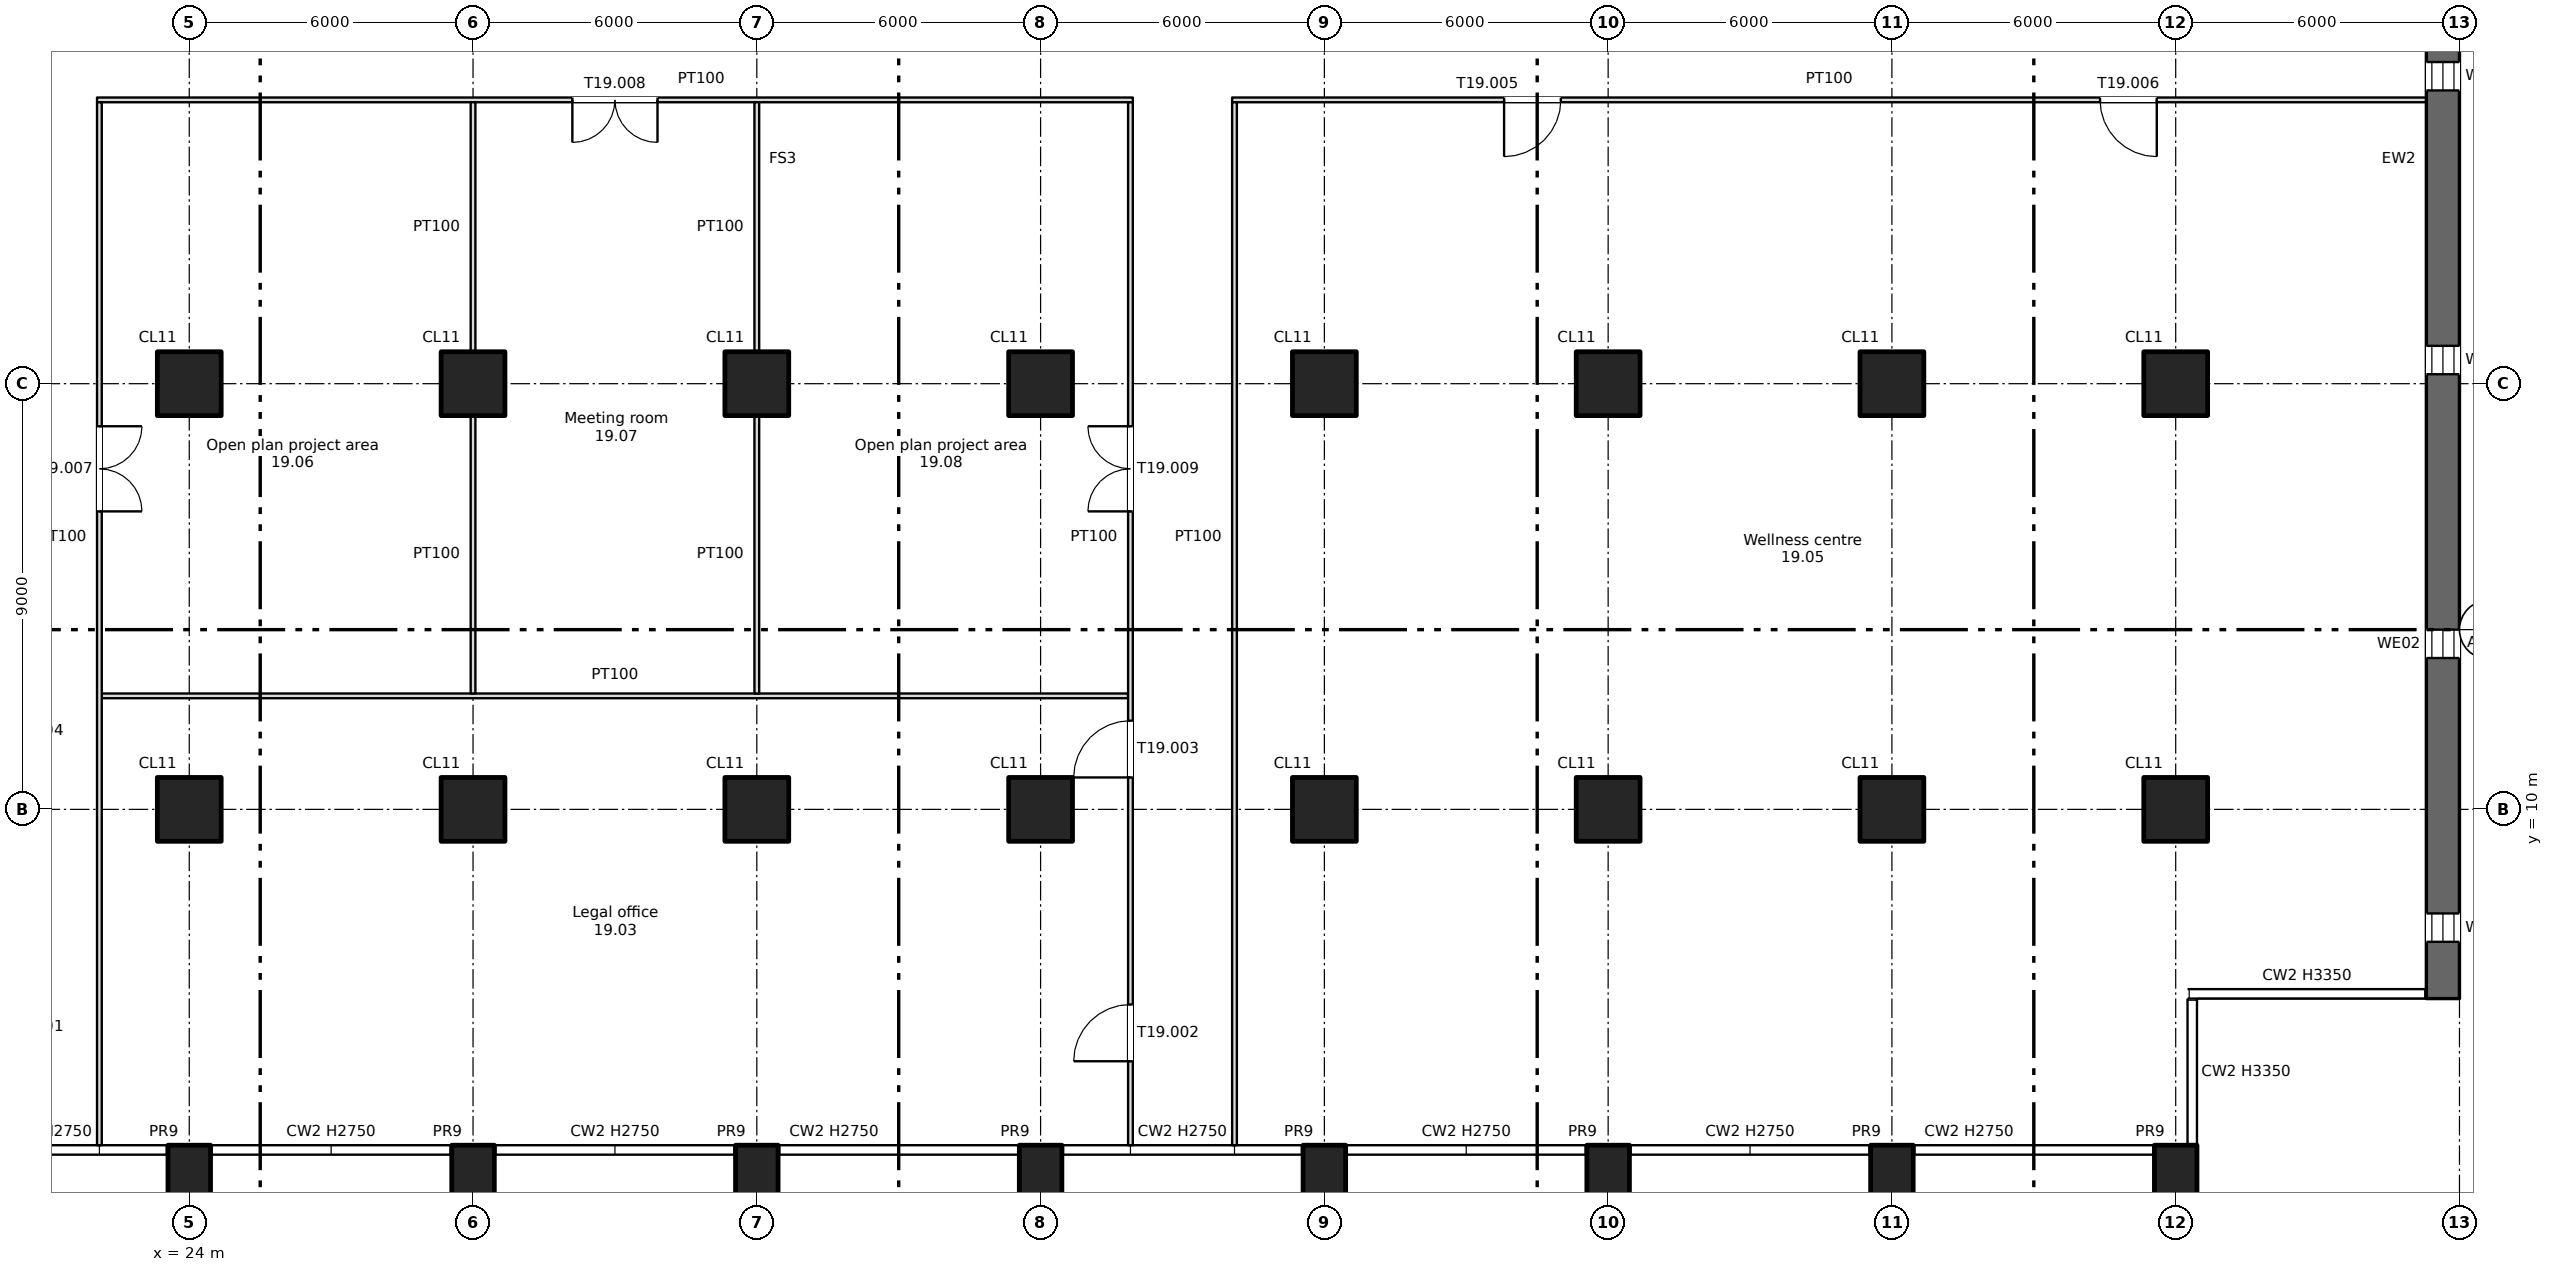
"""IFC4 building model, lengths in metres.
Left out: names, types, materials, properties, quantities, classifications, styles, units other than length and angle.
Written with IfcOpenShell. Run it as: python <this file> out.ifc"""

import sys

from ifc_helpers import new_model, si_unit, direction, frame, frame_2d, origin, origin_2d, place, context, subcontext, project, spatial, rectangle, extrude, element, fill, save


model = new_model("IFC4")
c1 = context("Model", 3, precision=1e-05, world=origin(), true_north=direction((0.0, 1.0)))
c2 = subcontext(c1, "Body", "Model", "MODEL_VIEW")
j1 = project(units=[si_unit("LENGTHUNIT", "METRE"), si_unit("PLANEANGLEUNIT", "RADIAN")], contexts=[c1])
p1 = place(None, origin())
s1 = spatial("IfcSite", under=j1, at=p1, CompositionType="ELEMENT")
p2 = place(p1, origin())
s2 = spatial("IfcBuilding", under=s1, at=p2, CompositionType="ELEMENT")
p3 = place(p2, frame((0.0, 0.0, 121.25)))
s3 = spatial("IfcBuildingStorey", under=s2, at=p3, CompositionType="ELEMENT", Elevation=121.25)
for number, where, z_axis, x_axis in (
    (1, (24.0, 2.2, -0.4), (0.0, 0.0, 1.0), (1.0, 0.0, 0.0)),
    (2, (30.0, 2.2, -0.4), (0.0, 0.0, 1.0), (1.0, 0.0, 0.0)),
    (3, (36.0, 2.2, -0.4), (0.0, 0.0, 1.0), (1.0, 0.0, 0.0)),
    (4, (42.0, 2.2, -0.4), (0.0, 0.0, 1.0), (1.0, 0.0, 0.0)),
    (5, (48.0, 2.2, -0.4), (0.0, 0.0, 1.0), (1.0, 0.0, 0.0)),
    (6, (54.0, 2.2, -0.4), (0.0, 0.0, 1.0), (1.0, 0.0, 0.0)),
    (7, (60.0, 2.2, -0.4), (0.0, 0.0, 1.0), (1.0, 0.0, 0.0)),
    (8, (66.0, 2.2, -0.4), (0.0, 0.0, 1.0), (1.0, 0.0, 0.0)),
):
    element("IfcColumn", number, at=place(p3, frame(where, z_axis=z_axis, x_axis=x_axis)), inside=s3, PredefinedType="COLUMN", context=c2, shape_type="SweptSolid", body=[
        extrude(rectangle(XDim=0.9, YDim=1.4, at=origin_2d()), origin(), (0.0, 0.0, 1.0), 3.75),
    ])
for number, where, z_axis, x_axis in (
    (9, (24.0, 10.0, 0.0), (0.0, 0.0, 1.0), (1.0, 0.0, 0.0)),
    (10, (24.0, 19.0, 0.0), (0.0, 0.0, 1.0), (1.0, 0.0, 0.0)),
    (11, (30.0, 10.0, 0.0), (0.0, 0.0, 1.0), (1.0, 0.0, 0.0)),
    (12, (30.0, 19.0, 0.0), (0.0, 0.0, 1.0), (1.0, 0.0, 0.0)),
    (13, (36.0, 10.0, 0.0), (0.0, 0.0, 1.0), (1.0, 0.0, 0.0)),
    (14, (36.0, 19.0, 0.0), (0.0, 0.0, 1.0), (1.0, 0.0, 0.0)),
    (15, (42.0, 10.0, 0.0), (0.0, 0.0, 1.0), (1.0, 0.0, 0.0)),
    (16, (42.0, 19.0, 0.0), (0.0, 0.0, 1.0), (1.0, 0.0, 0.0)),
    (17, (48.0, 10.0, 0.0), (0.0, 0.0, 1.0), (1.0, 0.0, 0.0)),
    (18, (48.0, 19.0, 0.0), (0.0, 0.0, 1.0), (1.0, 0.0, 0.0)),
    (19, (54.0, 10.0, 0.0), (0.0, 0.0, 1.0), (1.0, 0.0, 0.0)),
    (20, (54.0, 19.0, 0.0), (0.0, 0.0, 1.0), (1.0, 0.0, 0.0)),
    (21, (60.0, 10.0, 0.0), (0.0, 0.0, 1.0), (1.0, 0.0, 0.0)),
    (22, (60.0, 19.0, 0.0), (0.0, 0.0, 1.0), (1.0, 0.0, 0.0)),
    (23, (66.0, 10.0, 0.0), (0.0, 0.0, 1.0), (1.0, 0.0, 0.0)),
    (24, (66.0, 19.0, 0.0), (0.0, 0.0, 1.0), (1.0, 0.0, 0.0)),
):
    element("IfcColumn", number, at=place(p3, frame(where, z_axis=z_axis, x_axis=x_axis)), inside=s3, PredefinedType="COLUMN", context=c2, shape_type="SweptSolid", body=[
        extrude(rectangle(XDim=1.35, YDim=1.35, at=origin_2d()), origin(), (0.0, 0.0, 1.0), 3.35),
    ])
p4 = place(p3, frame((71.65, 6.0, 0.0), z_axis=(0.0, 0.0, 1.0), x_axis=(0.0, 1.0, 0.0)))
e25 = element("IfcWall", 25, at=p4, inside=s3, PredefinedType="SHEAR", context=c2, shape_type="SweptSolid", body=[
    extrude(rectangle(XDim=35.5, YDim=0.7, at=frame_2d((17.75, 0.0))), origin(), (0.0, 0.0, 1.0), 3.35),
])
p5 = place(p4, frame((1.2, 0.0, 0.6)))
e26 = element("IfcOpeningElement", 26, at=p5, cuts=e25, PredefinedType="OPENING", context=c2, shape_type="SweptSolid", body=[
    extrude(rectangle(XDim=0.6, YDim=2.4, at=frame_2d((0.3, 1.2))), frame((0.0, 0.36, 0.0), z_axis=(0.0, -1.0, 0.0), x_axis=(1.0, 0.0, 0.0)), (0.0, 0.0, 1.0), 0.72),
])
p6 = place(p4, frame((7.2, 0.0, 0.6)))
e27 = element("IfcOpeningElement", 27, at=p6, cuts=e25, PredefinedType="OPENING", context=c2, shape_type="SweptSolid", body=[
    extrude(rectangle(XDim=0.6, YDim=2.4, at=frame_2d((0.3, 1.2))), frame((0.0, 0.36, 0.0), z_axis=(0.0, -1.0, 0.0), x_axis=(1.0, 0.0, 0.0)), (0.0, 0.0, 1.0), 0.72),
])
p7 = place(p4, frame((13.2, 0.0, 0.6)))
e28 = element("IfcOpeningElement", 28, at=p7, cuts=e25, PredefinedType="OPENING", context=c2, shape_type="SweptSolid", body=[
    extrude(rectangle(XDim=0.6, YDim=2.4, at=frame_2d((0.3, 1.2))), frame((0.0, 0.36, 0.0), z_axis=(0.0, -1.0, 0.0), x_axis=(1.0, 0.0, 0.0)), (0.0, 0.0, 1.0), 0.72),
])
p8 = place(p4, frame((19.2, 0.0, 0.6)))
e29 = element("IfcOpeningElement", 29, at=p8, cuts=e25, PredefinedType="OPENING", context=c2, shape_type="SweptSolid", body=[
    extrude(rectangle(XDim=0.6, YDim=2.4, at=frame_2d((0.3, 1.2))), frame((0.0, 0.36, 0.0), z_axis=(0.0, -1.0, 0.0), x_axis=(1.0, 0.0, 0.0)), (0.0, 0.0, 1.0), 0.72),
])
p9 = place(p4, frame((25.2, 0.0, 0.6)))
e30 = element("IfcOpeningElement", 30, at=p9, cuts=e25, PredefinedType="OPENING", context=c2, shape_type="SweptSolid", body=[
    extrude(rectangle(XDim=0.6, YDim=2.4, at=frame_2d((0.3, 1.2))), frame((0.0, 0.36, 0.0), z_axis=(0.0, -1.0, 0.0), x_axis=(1.0, 0.0, 0.0)), (0.0, 0.0, 1.0), 0.72),
])
p10 = place(p4, frame((31.2, 0.0, 0.6)))
e31 = element("IfcOpeningElement", 31, at=p10, cuts=e25, PredefinedType="OPENING", context=c2, shape_type="SweptSolid", body=[
    extrude(rectangle(XDim=0.6, YDim=2.4, at=frame_2d((0.3, 1.2))), frame((0.0, 0.36, 0.0), z_axis=(0.0, -1.0, 0.0), x_axis=(1.0, 0.0, 0.0)), (0.0, 0.0, 1.0), 0.72),
])
p11 = place(p3, frame((22.15, 12.4, 0.0), z_axis=(0.0, 0.0, 1.0), x_axis=(1.0, 0.0, 0.0)))
e32 = element("IfcWall", 32, at=p11, inside=s3, PredefinedType="PARTITIONING", context=c2, shape_type="SweptSolid", body=[
    extrude(rectangle(XDim=21.7, YDim=0.1, at=frame_2d((10.85, 0.0))), origin(), (0.0, 0.0, 1.0), 3.35),
])
p12 = place(p3, frame((22.05, 25.0, 0.0), z_axis=(0.0, 0.0, 1.0), x_axis=(1.0, 0.0, 0.0)))
e33 = element("IfcWall", 33, at=p12, inside=s3, PredefinedType="PARTITIONING", context=c2, shape_type="SweptSolid", body=[
    extrude(rectangle(XDim=21.9, YDim=0.1, at=frame_2d((10.95, 0.0))), origin(), (0.0, 0.0, 1.0), 3.35),
])
p13 = place(p12, frame((10.05, 0.0, 0.0)))
e34 = element("IfcOpeningElement", 34, at=p13, cuts=e33, PredefinedType="OPENING", context=c2, shape_type="SweptSolid", body=[
    extrude(rectangle(XDim=1.8, YDim=2.1, at=frame_2d((0.9, 1.05))), frame((0.0, 0.06, 0.0), z_axis=(0.0, -1.0, 0.0), x_axis=(1.0, 0.0, 0.0)), (0.0, 0.0, 1.0), 0.12),
])
p14 = place(p3, frame((46.05, 25.0, 0.0), z_axis=(0.0, 0.0, 1.0), x_axis=(1.0, 0.0, 0.0)))
e35 = element("IfcWall", 35, at=p14, inside=s3, PredefinedType="PARTITIONING", context=c2, shape_type="SweptSolid", body=[
    extrude(rectangle(XDim=25.25, YDim=0.1, at=frame_2d((12.625, 0.0))), origin(), (0.0, 0.0, 1.0), 3.35),
])
p15 = place(p14, frame((5.75, 0.0, 0.0)))
e36 = element("IfcOpeningElement", 36, at=p15, cuts=e35, PredefinedType="OPENING", context=c2, shape_type="SweptSolid", body=[
    extrude(rectangle(XDim=1.2, YDim=2.1, at=frame_2d((0.6, 1.05))), frame((0.0, 0.06, 0.0), z_axis=(0.0, -1.0, 0.0), x_axis=(1.0, 0.0, 0.0)), (0.0, 0.0, 1.0), 0.12),
])
p16 = place(p14, frame((18.35, 0.0, 0.0)))
e37 = element("IfcOpeningElement", 37, at=p16, cuts=e35, PredefinedType="OPENING", context=c2, shape_type="SweptSolid", body=[
    extrude(rectangle(XDim=1.2, YDim=2.1, at=frame_2d((0.6, 1.05))), frame((0.0, 0.06, 0.0), z_axis=(0.0, -1.0, 0.0), x_axis=(1.0, 0.0, 0.0)), (0.0, 0.0, 1.0), 0.12),
])
p17 = place(p3, frame((22.1, 2.9, 0.0), z_axis=(0.0, 0.0, 1.0), x_axis=(0.0, 1.0, 0.0)))
e38 = element("IfcWall", 38, at=p17, inside=s3, PredefinedType="PARTITIONING", context=c2, shape_type="SweptSolid", body=[
    extrude(rectangle(XDim=22.05, YDim=0.1, at=frame_2d((11.025, 0.0))), origin(), (0.0, 0.0, 1.0), 3.35),
])
p18 = place(p17, frame((13.4, 0.0, 0.0)))
e39 = element("IfcOpeningElement", 39, at=p18, cuts=e38, PredefinedType="OPENING", context=c2, shape_type="SweptSolid", body=[
    extrude(rectangle(XDim=1.8, YDim=2.1, at=frame_2d((0.9, 1.05))), frame((0.0, 0.06, 0.0), z_axis=(0.0, -1.0, 0.0), x_axis=(1.0, 0.0, 0.0)), (0.0, 0.0, 1.0), 0.12),
])
p19 = place(p3, frame((30.0, 12.45, 0.0), z_axis=(0.0, 0.0, 1.0), x_axis=(0.0, 1.0, 0.0)))
e40 = element("IfcWall", 40, at=p19, inside=s3, PredefinedType="PARTITIONING", context=c2, shape_type="SweptSolid", body=[
    extrude(rectangle(XDim=5.875, YDim=0.1, at=frame_2d((2.938, 0.0))), origin(), (0.0, 0.0, 1.0), 3.35),
])
p20 = place(p3, frame((30.0, 19.675, 0.0), z_axis=(0.0, 0.0, 1.0), x_axis=(0.0, 1.0, 0.0)))
e41 = element("IfcWall", 41, at=p20, inside=s3, PredefinedType="PARTITIONING", context=c2, shape_type="SweptSolid", body=[
    extrude(rectangle(XDim=5.275, YDim=0.1, at=frame_2d((2.637, 0.0))), origin(), (0.0, 0.0, 1.0), 3.35),
])
p21 = place(p3, frame((36.0, 12.45, 0.0), z_axis=(0.0, 0.0, 1.0), x_axis=(0.0, 1.0, 0.0)))
e42 = element("IfcWall", 42, at=p21, inside=s3, PredefinedType="PARTITIONING", context=c2, shape_type="SweptSolid", body=[
    extrude(rectangle(XDim=5.875, YDim=0.1, at=frame_2d((2.938, 0.0))), origin(), (0.0, 0.0, 1.0), 3.35),
])
p22 = place(p3, frame((36.0, 19.675, 0.0), z_axis=(0.0, 0.0, 1.0), x_axis=(0.0, 1.0, 0.0)))
e43 = element("IfcWall", 43, at=p22, inside=s3, PredefinedType="PARTITIONING", context=c2, shape_type="SweptSolid", body=[
    extrude(rectangle(XDim=5.275, YDim=0.1, at=frame_2d((2.637, 0.0))), origin(), (0.0, 0.0, 1.0), 3.35),
])
p23 = place(p3, frame((43.9, 2.9, 0.0), z_axis=(0.0, 0.0, 1.0), x_axis=(0.0, 1.0, 0.0)))
e44 = element("IfcWall", 44, at=p23, inside=s3, PredefinedType="PARTITIONING", context=c2, shape_type="SweptSolid", body=[
    extrude(rectangle(XDim=22.05, YDim=0.1, at=frame_2d((11.025, 0.0))), origin(), (0.0, 0.0, 1.0), 3.35),
])
p24 = place(p23, frame((1.775, 0.0, 0.0)))
e45 = element("IfcOpeningElement", 45, at=p24, cuts=e44, PredefinedType="OPENING", context=c2, shape_type="SweptSolid", body=[
    extrude(rectangle(XDim=1.2, YDim=2.1, at=frame_2d((0.6, 1.05))), frame((0.0, 0.06, 0.0), z_axis=(0.0, -1.0, 0.0), x_axis=(1.0, 0.0, 0.0)), (0.0, 0.0, 1.0), 0.12),
])
p25 = place(p23, frame((7.775, 0.0, 0.0)))
e46 = element("IfcOpeningElement", 46, at=p25, cuts=e44, PredefinedType="OPENING", context=c2, shape_type="SweptSolid", body=[
    extrude(rectangle(XDim=1.2, YDim=2.1, at=frame_2d((0.6, 1.05))), frame((0.0, 0.06, 0.0), z_axis=(0.0, -1.0, 0.0), x_axis=(1.0, 0.0, 0.0)), (0.0, 0.0, 1.0), 0.12),
])
p26 = place(p23, frame((13.4, 0.0, 0.0)))
e47 = element("IfcOpeningElement", 47, at=p26, cuts=e44, PredefinedType="OPENING", context=c2, shape_type="SweptSolid", body=[
    extrude(rectangle(XDim=1.8, YDim=2.1, at=frame_2d((0.9, 1.05))), frame((0.0, 0.06, 0.0), z_axis=(0.0, -1.0, 0.0), x_axis=(1.0, 0.0, 0.0)), (0.0, 0.0, 1.0), 0.12),
])
p27 = place(p3, frame((46.1, 2.9, 0.0), z_axis=(0.0, 0.0, 1.0), x_axis=(0.0, 1.0, 0.0)))
e48 = element("IfcWall", 48, at=p27, inside=s3, PredefinedType="PARTITIONING", context=c2, shape_type="SweptSolid", body=[
    extrude(rectangle(XDim=22.05, YDim=0.1, at=frame_2d((11.025, 0.0))), origin(), (0.0, 0.0, 1.0), 3.35),
])
p28 = place(p5, origin())
e49 = element("IfcWindow", 49, at=p28, inside=s3, PartitioningType="SINGLE_PANEL", PredefinedType="WINDOW", context=c2, shape_type="SweptSolid", body=[
    extrude(rectangle(XDim=0.6, YDim=2.4, at=frame_2d((0.3, 1.2))), frame((0.0, 0.03, 0.0), z_axis=(0.0, -1.0, 0.0), x_axis=(1.0, 0.0, 0.0)), (0.0, 0.0, 1.0), 0.06),
])
fill(e26, e49)
p29 = place(p6, origin())
e50 = element("IfcWindow", 50, at=p29, inside=s3, PartitioningType="SINGLE_PANEL", PredefinedType="WINDOW", context=c2, shape_type="SweptSolid", body=[
    extrude(rectangle(XDim=0.6, YDim=2.4, at=frame_2d((0.3, 1.2))), frame((0.0, 0.03, 0.0), z_axis=(0.0, -1.0, 0.0), x_axis=(1.0, 0.0, 0.0)), (0.0, 0.0, 1.0), 0.06),
])
fill(e27, e50)
p30 = place(p7, origin())
e51 = element("IfcWindow", 51, at=p30, inside=s3, PartitioningType="SINGLE_PANEL", PredefinedType="WINDOW", context=c2, shape_type="SweptSolid", body=[
    extrude(rectangle(XDim=0.6, YDim=2.4, at=frame_2d((0.3, 1.2))), frame((0.0, 0.03, 0.0), z_axis=(0.0, -1.0, 0.0), x_axis=(1.0, 0.0, 0.0)), (0.0, 0.0, 1.0), 0.06),
])
fill(e28, e51)
p31 = place(p8, origin())
e52 = element("IfcWindow", 52, at=p31, inside=s3, PartitioningType="SINGLE_PANEL", PredefinedType="WINDOW", context=c2, shape_type="SweptSolid", body=[
    extrude(rectangle(XDim=0.6, YDim=2.4, at=frame_2d((0.3, 1.2))), frame((0.0, 0.03, 0.0), z_axis=(0.0, -1.0, 0.0), x_axis=(1.0, 0.0, 0.0)), (0.0, 0.0, 1.0), 0.06),
])
fill(e29, e52)
p32 = place(p24, origin())
e53 = element("IfcDoor", 53, at=p32, inside=s3, OperationType="SINGLE_SWING_LEFT", PredefinedType="DOOR", context=c2, shape_type="SweptSolid", body=[
    extrude(rectangle(XDim=1.2, YDim=2.1, at=frame_2d((0.6, 1.05))), frame((0.0, 0.025, 0.0), z_axis=(0.0, -1.0, 0.0), x_axis=(1.0, 0.0, 0.0)), (0.0, 0.0, 1.0), 0.05),
])
fill(e45, e53)
p33 = place(p25, origin())
e54 = element("IfcDoor", 54, at=p33, inside=s3, OperationType="SINGLE_SWING_LEFT", PredefinedType="DOOR", context=c2, shape_type="SweptSolid", body=[
    extrude(rectangle(XDim=1.2, YDim=2.1, at=frame_2d((0.6, 1.05))), frame((0.0, 0.025, 0.0), z_axis=(0.0, -1.0, 0.0), x_axis=(1.0, 0.0, 0.0)), (0.0, 0.0, 1.0), 0.05),
])
fill(e46, e54)
p34 = place(p15, origin())
e55 = element("IfcDoor", 55, at=p34, inside=s3, OperationType="SINGLE_SWING_LEFT", PredefinedType="DOOR", context=c2, shape_type="SweptSolid", body=[
    extrude(rectangle(XDim=1.2, YDim=2.1, at=frame_2d((0.6, 1.05))), frame((0.0, 0.025, 0.0), z_axis=(0.0, -1.0, 0.0), x_axis=(1.0, 0.0, 0.0)), (0.0, 0.0, 1.0), 0.05),
])
fill(e36, e55)
p35 = place(p16, origin())
e56 = element("IfcDoor", 56, at=p35, inside=s3, OperationType="SINGLE_SWING_RIGHT", PredefinedType="DOOR", context=c2, shape_type="SweptSolid", body=[
    extrude(rectangle(XDim=1.2, YDim=2.1, at=frame_2d((0.6, 1.05))), frame((0.0, 0.025, 0.0), z_axis=(0.0, -1.0, 0.0), x_axis=(1.0, 0.0, 0.0)), (0.0, 0.0, 1.0), 0.05),
])
fill(e37, e56)
p36 = place(p18, origin())
e57 = element("IfcDoor", 57, at=p36, inside=s3, OperationType="DOUBLE_DOOR_SINGLE_SWING", PredefinedType="DOOR", context=c2, shape_type="SweptSolid", body=[
    extrude(rectangle(XDim=1.8, YDim=2.1, at=frame_2d((0.9, 1.05))), frame((0.0, 0.025, 0.0), z_axis=(0.0, -1.0, 0.0), x_axis=(1.0, 0.0, 0.0)), (0.0, 0.0, 1.0), 0.05),
])
fill(e39, e57)
p37 = place(p13, origin())
e58 = element("IfcDoor", 58, at=p37, inside=s3, OperationType="DOUBLE_DOOR_SINGLE_SWING", PredefinedType="DOOR", context=c2, shape_type="SweptSolid", body=[
    extrude(rectangle(XDim=1.8, YDim=2.1, at=frame_2d((0.9, 1.05))), frame((0.0, 0.025, 0.0), z_axis=(0.0, -1.0, 0.0), x_axis=(1.0, 0.0, 0.0)), (0.0, 0.0, 1.0), 0.05),
])
fill(e34, e58)
p38 = place(p26, origin())
e59 = element("IfcDoor", 59, at=p38, inside=s3, OperationType="DOUBLE_DOOR_SINGLE_SWING", PredefinedType="DOOR", context=c2, shape_type="SweptSolid", body=[
    extrude(rectangle(XDim=1.8, YDim=2.1, at=frame_2d((0.9, 1.05))), frame((0.0, 0.025, 0.0), z_axis=(0.0, -1.0, 0.0), x_axis=(1.0, 0.0, 0.0)), (0.0, 0.0, 1.0), 0.05),
])
fill(e47, e59)
save(model, sys.argv[1])
